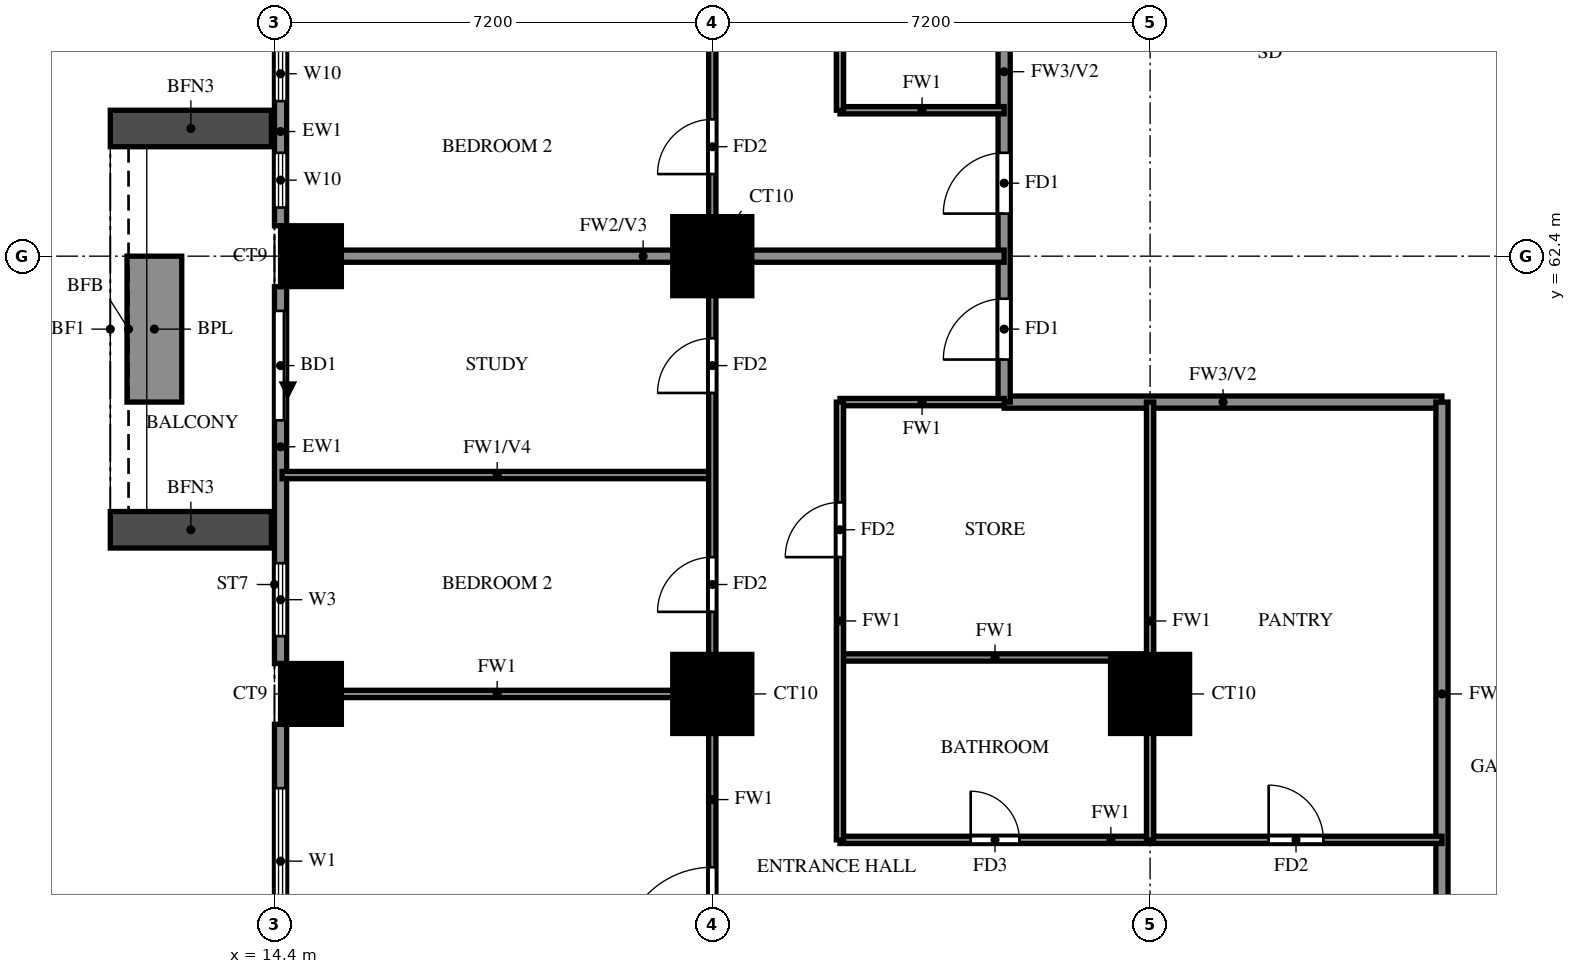
"""IFC4 building model, lengths in metres.
Left out: names, types, materials, properties, quantities, classifications, styles, units other than length and angle.
Written with IfcOpenShell. Run it as: python <this file> out.ifc"""

import sys

from ifc_helpers import new_model, si_unit, direction, frame, frame_2d, origin, origin_2d, place, context, subcontext, project, spatial, rectangle, extrude, source, transform, mapped, element, fill, save


model = new_model("IFC4")
c1 = context("Model", 3, precision=1e-05, world=origin(), true_north=direction((0.0, 1.0)))
c2 = subcontext(c1, "Body", "Model", "MODEL_VIEW")
j1 = project(units=[si_unit("LENGTHUNIT", "METRE"), si_unit("PLANEANGLEUNIT", "RADIAN")], contexts=[c1])
p1 = place(None, origin())
s1 = spatial("IfcSite", under=j1, at=p1, CompositionType="ELEMENT")
p2 = place(p1, origin())
s2 = spatial("IfcBuilding", under=s1, at=p2, CompositionType="ELEMENT")
p3 = place(p2, frame((0.0, 0.0, 72.5)))
s3 = spatial("IfcBuildingStorey", under=s2, at=p3, CompositionType="ELEMENT", Elevation=72.5)
m1 = source(origin(), c2, "Body", "SweptSolid", [
    extrude(rectangle(XDim=1.0, YDim=1.0, at=origin_2d()), origin(), (0.0, 0.0, 1.0), 3.18),
])
p4 = place(p3, frame((15.0, 55.2, 0.0), z_axis=(0.0, 0.0, 1.0), x_axis=(1.0, 0.0, 0.0)))
e1 = element("IfcColumn", 1, at=p4, inside=s3, PredefinedType="COLUMN", context=c2, shape_type="MappedRepresentation", body=[
    mapped(m1, transform((0.0, 0.0, 0.0))),
])
m2 = source(origin(), c2, "Body", "SweptSolid", [
    extrude(rectangle(XDim=1.3, YDim=1.3, at=origin_2d()), origin(), (0.0, 0.0, 1.0), 3.18),
])
for number, where, z_axis, x_axis in (
    (2, (21.6, 55.2, 0.0), (0.0, 0.0, 1.0), (1.0, 0.0, 0.0)),
    (3, (28.8, 55.2, 0.0), (0.0, 0.0, 1.0), (1.0, 0.0, 0.0)),
):
    element("IfcColumn", number, at=place(p3, frame(where, z_axis=z_axis, x_axis=x_axis)), inside=s3, PredefinedType="COLUMN", context=c2, shape_type="MappedRepresentation", body=[
        mapped(m2, transform((0.0, 0.0, 0.0))),
    ])
p5 = place(p3, frame((15.0, 62.4, 0.0), z_axis=(0.0, 0.0, 1.0), x_axis=(1.0, 0.0, 0.0)))
e4 = element("IfcColumn", 4, at=p5, inside=s3, PredefinedType="COLUMN", context=c2, shape_type="MappedRepresentation", body=[
    mapped(m1, transform((0.0, 0.0, 0.0))),
])
p6 = place(p3, frame((21.6, 62.4, 0.0), z_axis=(0.0, 0.0, 1.0), x_axis=(1.0, 0.0, 0.0)))
e5 = element("IfcColumn", 5, at=p6, inside=s3, PredefinedType="COLUMN", context=c2, shape_type="MappedRepresentation", body=[
    mapped(m2, transform((0.0, 0.0, 0.0))),
])
p7 = place(p3, frame((14.5, 69.1, 0.0), z_axis=(0.0, 0.0, 1.0), x_axis=(0.0, -1.0, 0.0)))
e6 = element("IfcWall", 6, at=p7, inside=s3, PredefinedType="SOLIDWALL", context=c2, shape_type="SweptSolid", body=[
    extrude(rectangle(XDim=6.2, YDim=0.2, at=frame_2d((3.1, 0.0))), origin(), (0.0, 0.0, 1.0), 3.18),
])
p8 = place(p7, frame((3.25, 0.0, 0.6)))
e7 = element("IfcOpeningElement", 7, at=p8, cuts=e6, PredefinedType="OPENING", context=c2, shape_type="SweptSolid", body=[
    extrude(rectangle(XDim=0.9, YDim=2.4, at=frame_2d((0.45, 1.2))), frame((0.0, 0.11, 0.0), z_axis=(0.0, -1.0, 0.0), x_axis=(1.0, 0.0, 0.0)), (0.0, 0.0, 1.0), 0.22),
])
p9 = place(p7, frame((5.0, 0.0, 0.6)))
e8 = element("IfcOpeningElement", 8, at=p9, cuts=e6, PredefinedType="OPENING", context=c2, shape_type="SweptSolid", body=[
    extrude(rectangle(XDim=0.9, YDim=2.4, at=frame_2d((0.45, 1.2))), frame((0.0, 0.11, 0.0), z_axis=(0.0, -1.0, 0.0), x_axis=(1.0, 0.0, 0.0)), (0.0, 0.0, 1.0), 0.22),
])
p10 = place(p7, frame((0.75, 0.0, 0.6)))
e9 = element("IfcOpeningElement", 9, at=p10, cuts=e6, PredefinedType="OPENING", context=c2, shape_type="SweptSolid", body=[
    extrude(rectangle(XDim=1.8, YDim=2.4, at=frame_2d((0.9, 1.2))), frame((0.0, 0.11, 0.0), z_axis=(0.0, -1.0, 0.0), x_axis=(1.0, 0.0, 0.0)), (0.0, 0.0, 1.0), 0.22),
])
p11 = place(p3, frame((14.5, 61.9, 0.0), z_axis=(0.0, 0.0, 1.0), x_axis=(0.0, -1.0, 0.0)))
e10 = element("IfcWall", 10, at=p11, inside=s3, PredefinedType="SOLIDWALL", context=c2, shape_type="SweptSolid", body=[
    extrude(rectangle(XDim=6.2, YDim=0.2, at=frame_2d((3.1, 0.0))), origin(), (0.0, 0.0, 1.0), 3.18),
])
p12 = place(p11, frame((0.4, 0.0, 0.0)))
e11 = element("IfcOpeningElement", 11, at=p12, cuts=e10, PredefinedType="OPENING", context=c2, shape_type="SweptSolid", body=[
    extrude(rectangle(XDim=1.8, YDim=2.4, at=frame_2d((0.9, 1.2))), frame((0.0, 0.11, 0.0), z_axis=(0.0, -1.0, 0.0), x_axis=(1.0, 0.0, 0.0)), (0.0, 0.0, 1.0), 0.22),
])
p13 = place(p11, frame((4.55, 0.0, 0.6)))
e12 = element("IfcOpeningElement", 12, at=p13, cuts=e10, PredefinedType="OPENING", context=c2, shape_type="SweptSolid", body=[
    extrude(rectangle(XDim=1.2, YDim=2.4, at=frame_2d((0.6, 1.2))), frame((0.0, 0.11, 0.0), z_axis=(0.0, -1.0, 0.0), x_axis=(1.0, 0.0, 0.0)), (0.0, 0.0, 1.0), 0.22),
])
p14 = place(p3, frame((14.5, 54.7, 0.0), z_axis=(0.0, 0.0, 1.0), x_axis=(0.0, -1.0, 0.0)))
e13 = element("IfcWall", 13, at=p14, inside=s3, PredefinedType="SOLIDWALL", context=c2, shape_type="SweptSolid", body=[
    extrude(rectangle(XDim=6.2, YDim=0.2, at=frame_2d((3.1, 0.0))), origin(), (0.0, 0.0, 1.0), 3.18),
])
p15 = place(p14, frame((1.05, 0.0, 0.6)))
e14 = element("IfcOpeningElement", 14, at=p15, cuts=e13, PredefinedType="OPENING", context=c2, shape_type="SweptSolid", body=[
    extrude(rectangle(XDim=2.4, YDim=2.4, at=frame_2d((1.2, 1.2))), frame((0.0, 0.11, 0.0), z_axis=(0.0, -1.0, 0.0), x_axis=(1.0, 0.0, 0.0)), (0.0, 0.0, 1.0), 0.22),
])
for number, where, z_axis, x_axis in (
    (15, (14.35, 64.5, 0.0), (0.0, 0.0, 1.0), (-1.0, 0.0, 0.0)),
    (16, (14.35, 57.9, 0.0), (0.0, 0.0, 1.0), (-1.0, 0.0, 0.0)),
):
    element("IfcWall", number, at=place(p3, frame(where, z_axis=z_axis, x_axis=x_axis)), inside=s3, PredefinedType="SOLIDWALL", context=c2, shape_type="SweptSolid", body=[
        extrude(rectangle(XDim=2.65, YDim=0.6, at=frame_2d((1.325, 0.0))), origin(), (0.0, 0.0, 1.0), 2.85),
    ])
p16 = place(p3, frame((12.425, 62.4, 0.0), z_axis=(0.0, 0.0, 1.0), x_axis=(0.0, -1.0, 0.0)))
e17 = element("IfcWall", 17, at=p16, inside=s3, PredefinedType="SOLIDWALL", context=c2, shape_type="SweptSolid", body=[
    extrude(rectangle(XDim=2.4, YDim=0.9, at=frame_2d((1.2, 0.0))), origin(), (0.0, 0.0, 1.0), 0.9),
])
p17 = place(p3, frame((26.4, 60.0, 0.0), z_axis=(0.0, 0.0, 1.0), x_axis=(1.0, 0.0, 0.0)))
e18 = element("IfcWall", 18, at=p17, inside=s3, PredefinedType="SOLIDWALL", context=c2, shape_type="SweptSolid", body=[
    extrude(rectangle(XDim=7.2, YDim=0.2, at=frame_2d((3.6, 0.0))), origin(), (0.0, 0.0, 1.0), 3.18),
])
p18 = place(p3, frame((26.4, 60.0, 0.0), z_axis=(0.0, 0.0, 1.0), x_axis=(0.0, 1.0, 0.0)))
e19 = element("IfcWall", 19, at=p18, inside=s3, PredefinedType="SOLIDWALL", context=c2, shape_type="SweptSolid", body=[
    extrude(rectangle(XDim=9.45, YDim=0.2, at=frame_2d((4.725, 0.0))), origin(), (0.0, 0.0, 1.0), 3.18),
])
p19 = place(p18, frame((0.7, 0.0, 0.0)))
e20 = element("IfcOpeningElement", 20, at=p19, cuts=e19, PredefinedType="OPENING", context=c2, shape_type="SweptSolid", body=[
    extrude(rectangle(XDim=1.0, YDim=2.1, at=frame_2d((0.5, 1.05))), frame((0.0, 0.11, 0.0), z_axis=(0.0, -1.0, 0.0), x_axis=(1.0, 0.0, 0.0)), (0.0, 0.0, 1.0), 0.22),
])
p20 = place(p18, frame((3.1, 0.0, 0.0)))
e21 = element("IfcOpeningElement", 21, at=p20, cuts=e19, PredefinedType="OPENING", context=c2, shape_type="SweptSolid", body=[
    extrude(rectangle(XDim=1.0, YDim=2.1, at=frame_2d((0.5, 1.05))), frame((0.0, 0.11, 0.0), z_axis=(0.0, -1.0, 0.0), x_axis=(1.0, 0.0, 0.0)), (0.0, 0.0, 1.0), 0.22),
])
p21 = place(p3, frame((33.6, 50.4, 0.0), z_axis=(0.0, 0.0, 1.0), x_axis=(0.0, 1.0, 0.0)))
e22 = element("IfcWall", 22, at=p21, inside=s3, PredefinedType="SOLIDWALL", context=c2, shape_type="SweptSolid", body=[
    extrude(rectangle(XDim=9.6, YDim=0.2, at=frame_2d((4.8, 0.0))), origin(), (0.0, 0.0, 1.0), 3.18),
])
p22 = place(p3, frame((14.525, 62.4, 0.0), z_axis=(0.0, 0.0, 1.0), x_axis=(1.0, 0.0, 0.0)))
e23 = element("IfcWall", 23, at=p22, inside=s3, PredefinedType="SOLIDWALL", context=c2, shape_type="SweptSolid", body=[
    extrude(rectangle(XDim=11.875, YDim=0.2, at=frame_2d((5.938, 0.0))), origin(), (0.0, 0.0, 1.0), 3.18),
])
p23 = place(p3, frame((23.7, 52.8, 0.0), z_axis=(0.0, 0.0, 1.0), x_axis=(1.0, 0.0, 0.0)))
e24 = element("IfcWall", 24, at=p23, inside=s3, PredefinedType="PARTITIONING", context=c2, shape_type="SweptSolid", body=[
    extrude(rectangle(XDim=9.9, YDim=0.12, at=frame_2d((4.95, 0.0))), origin(), (0.0, 0.0, 1.0), 3.18),
])
p24 = place(p23, frame((2.15, 0.0, 0.0)))
e25 = element("IfcOpeningElement", 25, at=p24, cuts=e24, PredefinedType="OPENING", context=c2, shape_type="SweptSolid", body=[
    extrude(rectangle(XDim=0.8, YDim=2.1, at=frame_2d((0.4, 1.05))), frame((0.0, 0.07, 0.0), z_axis=(0.0, -1.0, 0.0), x_axis=(1.0, 0.0, 0.0)), (0.0, 0.0, 1.0), 0.14),
])
p25 = place(p23, frame((7.05, 0.0, 0.0)))
e26 = element("IfcOpeningElement", 26, at=p25, cuts=e24, PredefinedType="OPENING", context=c2, shape_type="SweptSolid", body=[
    extrude(rectangle(XDim=0.9, YDim=2.1, at=frame_2d((0.45, 1.05))), frame((0.0, 0.07, 0.0), z_axis=(0.0, -1.0, 0.0), x_axis=(1.0, 0.0, 0.0)), (0.0, 0.0, 1.0), 0.14),
])
p26 = place(p3, frame((14.525, 55.2, 0.0), z_axis=(0.0, 0.0, 1.0), x_axis=(1.0, 0.0, 0.0)))
e27 = element("IfcWall", 27, at=p26, inside=s3, PredefinedType="PARTITIONING", context=c2, shape_type="SweptSolid", body=[
    extrude(rectangle(XDim=7.075, YDim=0.12, at=frame_2d((3.538, 0.0))), origin(), (0.0, 0.0, 1.0), 3.18),
])
p27 = place(p3, frame((23.7, 55.8, 0.0), z_axis=(0.0, 0.0, 1.0), x_axis=(1.0, 0.0, 0.0)))
e28 = element("IfcWall", 28, at=p27, inside=s3, PredefinedType="PARTITIONING", context=c2, shape_type="SweptSolid", body=[
    extrude(rectangle(XDim=5.1, YDim=0.12, at=frame_2d((2.55, 0.0))), origin(), (0.0, 0.0, 1.0), 3.18),
])
p28 = place(p3, frame((14.525, 58.8, 0.0), z_axis=(0.0, 0.0, 1.0), x_axis=(1.0, 0.0, 0.0)))
e29 = element("IfcWall", 29, at=p28, inside=s3, PredefinedType="PARTITIONING", context=c2, shape_type="SweptSolid", body=[
    extrude(rectangle(XDim=7.075, YDim=0.12, at=frame_2d((3.538, 0.0))), origin(), (0.0, 0.0, 1.0), 2.28),
])
for number, where, z_axis, x_axis in (
    (30, (23.7, 60.0, 0.0), (0.0, 0.0, 1.0), (1.0, 0.0, 0.0)),
    (31, (23.7, 64.8, 0.0), (0.0, 0.0, 1.0), (1.0, 0.0, 0.0)),
):
    element("IfcWall", number, at=place(p3, frame(where, z_axis=z_axis, x_axis=x_axis)), inside=s3, PredefinedType="PARTITIONING", context=c2, shape_type="SweptSolid", body=[
        extrude(rectangle(XDim=2.7, YDim=0.12, at=frame_2d((1.35, 0.0))), origin(), (0.0, 0.0, 1.0), 3.18),
    ])
p29 = place(p3, frame((21.6, 33.725, 0.0), z_axis=(0.0, 0.0, 1.0), x_axis=(0.0, 1.0, 0.0)))
e32 = element("IfcWall", 32, at=p29, inside=s3, PredefinedType="PARTITIONING", context=c2, shape_type="SweptSolid", body=[
    extrude(rectangle(XDim=39.475, YDim=0.12, at=frame_2d((19.737, 0.0))), origin(), (0.0, 0.0, 1.0), 3.18),
])
p30 = place(p29, frame((7.775, 0.0, 0.0)))
e33 = element("IfcOpeningElement", 33, at=p30, cuts=e32, PredefinedType="OPENING", context=c2, shape_type="SweptSolid", body=[
    extrude(rectangle(XDim=0.9, YDim=2.1, at=frame_2d((0.45, 1.05))), frame((0.0, 0.07, 0.0), z_axis=(0.0, -1.0, 0.0), x_axis=(1.0, 0.0, 0.0)), (0.0, 0.0, 1.0), 0.14),
])
p31 = place(p29, frame((17.125, 0.0, 0.0)))
e34 = element("IfcOpeningElement", 34, at=p31, cuts=e32, PredefinedType="OPENING", context=c2, shape_type="SweptSolid", body=[
    extrude(rectangle(XDim=1.5, YDim=2.1, at=frame_2d((0.75, 1.05))), frame((0.0, 0.07, 0.0), z_axis=(0.0, -1.0, 0.0), x_axis=(1.0, 0.0, 0.0)), (0.0, 0.0, 1.0), 0.14),
])
p32 = place(p29, frame((22.825, 0.0, 0.0)))
e35 = element("IfcOpeningElement", 35, at=p32, cuts=e32, PredefinedType="OPENING", context=c2, shape_type="SweptSolid", body=[
    extrude(rectangle(XDim=0.9, YDim=2.1, at=frame_2d((0.45, 1.05))), frame((0.0, 0.07, 0.0), z_axis=(0.0, -1.0, 0.0), x_axis=(1.0, 0.0, 0.0)), (0.0, 0.0, 1.0), 0.14),
])
p33 = place(p29, frame((26.425, 0.0, 0.0)))
e36 = element("IfcOpeningElement", 36, at=p33, cuts=e32, PredefinedType="OPENING", context=c2, shape_type="SweptSolid", body=[
    extrude(rectangle(XDim=0.9, YDim=2.1, at=frame_2d((0.45, 1.05))), frame((0.0, 0.07, 0.0), z_axis=(0.0, -1.0, 0.0), x_axis=(1.0, 0.0, 0.0)), (0.0, 0.0, 1.0), 0.14),
])
p34 = place(p29, frame((30.025, 0.0, 0.0)))
e37 = element("IfcOpeningElement", 37, at=p34, cuts=e32, PredefinedType="OPENING", context=c2, shape_type="SweptSolid", body=[
    extrude(rectangle(XDim=0.9, YDim=2.1, at=frame_2d((0.45, 1.05))), frame((0.0, 0.07, 0.0), z_axis=(0.0, -1.0, 0.0), x_axis=(1.0, 0.0, 0.0)), (0.0, 0.0, 1.0), 0.14),
])
p35 = place(p29, frame((33.625, 0.0, 0.0)))
e38 = element("IfcOpeningElement", 38, at=p35, cuts=e32, PredefinedType="OPENING", context=c2, shape_type="SweptSolid", body=[
    extrude(rectangle(XDim=0.9, YDim=2.1, at=frame_2d((0.45, 1.05))), frame((0.0, 0.07, 0.0), z_axis=(0.0, -1.0, 0.0), x_axis=(1.0, 0.0, 0.0)), (0.0, 0.0, 1.0), 0.14),
])
p36 = place(p29, frame((37.225, 0.0, 0.0)))
e39 = element("IfcOpeningElement", 39, at=p36, cuts=e32, PredefinedType="OPENING", context=c2, shape_type="SweptSolid", body=[
    extrude(rectangle(XDim=0.9, YDim=2.1, at=frame_2d((0.45, 1.05))), frame((0.0, 0.07, 0.0), z_axis=(0.0, -1.0, 0.0), x_axis=(1.0, 0.0, 0.0)), (0.0, 0.0, 1.0), 0.14),
])
p37 = place(p3, frame((23.7, 52.8, 0.0), z_axis=(0.0, 0.0, 1.0), x_axis=(0.0, 1.0, 0.0)))
e40 = element("IfcWall", 40, at=p37, inside=s3, PredefinedType="PARTITIONING", context=c2, shape_type="SweptSolid", body=[
    extrude(rectangle(XDim=7.2, YDim=0.12, at=frame_2d((3.6, 0.0))), origin(), (0.0, 0.0, 1.0), 3.18),
])
p38 = place(p37, frame((4.65, 0.0, 0.0)))
e41 = element("IfcOpeningElement", 41, at=p38, cuts=e40, PredefinedType="OPENING", context=c2, shape_type="SweptSolid", body=[
    extrude(rectangle(XDim=0.9, YDim=2.1, at=frame_2d((0.45, 1.05))), frame((0.0, 0.07, 0.0), z_axis=(0.0, -1.0, 0.0), x_axis=(1.0, 0.0, 0.0)), (0.0, 0.0, 1.0), 0.14),
])
p39 = place(p3, frame((23.7, 64.8, 0.0), z_axis=(0.0, 0.0, 1.0), x_axis=(0.0, 1.0, 0.0)))
e42 = element("IfcWall", 42, at=p39, inside=s3, PredefinedType="PARTITIONING", context=c2, shape_type="SweptSolid", body=[
    extrude(rectangle(XDim=8.4, YDim=0.12, at=frame_2d((4.2, 0.0))), origin(), (0.0, 0.0, 1.0), 3.18),
])
p40 = place(p39, frame((1.875, 0.0, 0.0)))
e43 = element("IfcOpeningElement", 43, at=p40, cuts=e42, PredefinedType="OPENING", context=c2, shape_type="SweptSolid", body=[
    extrude(rectangle(XDim=0.9, YDim=2.1, at=frame_2d((0.45, 1.05))), frame((0.0, 0.07, 0.0), z_axis=(0.0, -1.0, 0.0), x_axis=(1.0, 0.0, 0.0)), (0.0, 0.0, 1.0), 0.14),
])
p41 = place(p39, frame((6.125, 0.0, 0.0)))
e44 = element("IfcOpeningElement", 44, at=p41, cuts=e42, PredefinedType="OPENING", context=c2, shape_type="SweptSolid", body=[
    extrude(rectangle(XDim=0.8, YDim=2.1, at=frame_2d((0.4, 1.05))), frame((0.0, 0.07, 0.0), z_axis=(0.0, -1.0, 0.0), x_axis=(1.0, 0.0, 0.0)), (0.0, 0.0, 1.0), 0.14),
])
p42 = place(p3, frame((28.8, 52.8, 0.0), z_axis=(0.0, 0.0, 1.0), x_axis=(0.0, 1.0, 0.0)))
e45 = element("IfcWall", 45, at=p42, inside=s3, PredefinedType="PARTITIONING", context=c2, shape_type="SweptSolid", body=[
    extrude(rectangle(XDim=7.2, YDim=0.12, at=frame_2d((3.6, 0.0))), origin(), (0.0, 0.0, 1.0), 3.18),
])
p43 = place(p8, origin())
e46 = element("IfcWindow", 46, at=p43, inside=s3, PartitioningType="SINGLE_PANEL", PredefinedType="WINDOW", context=c2, shape_type="SweptSolid", body=[
    extrude(rectangle(XDim=0.9, YDim=2.4, at=frame_2d((0.45, 1.2))), frame((0.0, 0.03, 0.0), z_axis=(0.0, -1.0, 0.0), x_axis=(1.0, 0.0, 0.0)), (0.0, 0.0, 1.0), 0.06),
])
fill(e7, e46)
p44 = place(p9, origin())
e47 = element("IfcWindow", 47, at=p44, inside=s3, PartitioningType="SINGLE_PANEL", PredefinedType="WINDOW", context=c2, shape_type="SweptSolid", body=[
    extrude(rectangle(XDim=0.9, YDim=2.4, at=frame_2d((0.45, 1.2))), frame((0.0, 0.03, 0.0), z_axis=(0.0, -1.0, 0.0), x_axis=(1.0, 0.0, 0.0)), (0.0, 0.0, 1.0), 0.06),
])
fill(e8, e47)
p45 = place(p12, origin())
e48 = element("IfcDoor", 48, at=p45, inside=s3, OperationType="DOUBLE_DOOR_SLIDING", PredefinedType="DOOR", context=c2, shape_type="SweptSolid", body=[
    extrude(rectangle(XDim=1.8, YDim=2.4, at=frame_2d((0.9, 1.2))), frame((0.0, 0.025, 0.0), z_axis=(0.0, -1.0, 0.0), x_axis=(1.0, 0.0, 0.0)), (0.0, 0.0, 1.0), 0.05),
])
fill(e11, e48)
p46 = place(p13, origin())
e49 = element("IfcWindow", 49, at=p46, inside=s3, PartitioningType="SINGLE_PANEL", PredefinedType="WINDOW", context=c2, shape_type="SweptSolid", body=[
    extrude(rectangle(XDim=1.2, YDim=2.4, at=frame_2d((0.6, 1.2))), frame((0.0, 0.03, 0.0), z_axis=(0.0, -1.0, 0.0), x_axis=(1.0, 0.0, 0.0)), (0.0, 0.0, 1.0), 0.06),
])
fill(e12, e49)
p47 = place(p15, origin())
e50 = element("IfcWindow", 50, at=p47, inside=s3, PartitioningType="DOUBLE_PANEL_VERTICAL", PredefinedType="WINDOW", context=c2, shape_type="SweptSolid", body=[
    extrude(rectangle(XDim=2.4, YDim=2.4, at=frame_2d((1.2, 1.2))), frame((0.0, 0.03, 0.0), z_axis=(0.0, -1.0, 0.0), x_axis=(1.0, 0.0, 0.0)), (0.0, 0.0, 1.0), 0.06),
])
fill(e14, e50)
p48 = place(p19, origin())
e51 = element("IfcDoor", 51, at=p48, inside=s3, OperationType="SINGLE_SWING_RIGHT", PredefinedType="DOOR", context=c2, shape_type="SweptSolid", body=[
    extrude(rectangle(XDim=1.0, YDim=2.1, at=frame_2d((0.5, 1.05))), frame((0.0, 0.025, 0.0), z_axis=(0.0, -1.0, 0.0), x_axis=(1.0, 0.0, 0.0)), (0.0, 0.0, 1.0), 0.05),
])
fill(e20, e51)
p49 = place(p31, origin())
e52 = element("IfcDoor", 52, at=p49, inside=s3, OperationType="SINGLE_SWING_LEFT", PredefinedType="DOOR", context=c2, shape_type="SweptSolid", body=[
    extrude(rectangle(XDim=1.5, YDim=2.1, at=frame_2d((0.75, 1.05))), frame((0.0, 0.025, 0.0), z_axis=(0.0, -1.0, 0.0), x_axis=(1.0, 0.0, 0.0)), (0.0, 0.0, 1.0), 0.05),
])
fill(e34, e52)
p50 = place(p32, origin())
e53 = element("IfcDoor", 53, at=p50, inside=s3, OperationType="SINGLE_SWING_LEFT", PredefinedType="DOOR", context=c2, shape_type="SweptSolid", body=[
    extrude(rectangle(XDim=0.9, YDim=2.1, at=frame_2d((0.45, 1.05))), frame((0.0, 0.025, 0.0), z_axis=(0.0, -1.0, 0.0), x_axis=(1.0, 0.0, 0.0)), (0.0, 0.0, 1.0), 0.05),
])
fill(e35, e53)
p51 = place(p33, origin())
e54 = element("IfcDoor", 54, at=p51, inside=s3, OperationType="SINGLE_SWING_RIGHT", PredefinedType="DOOR", context=c2, shape_type="SweptSolid", body=[
    extrude(rectangle(XDim=0.9, YDim=2.1, at=frame_2d((0.45, 1.05))), frame((0.0, 0.025, 0.0), z_axis=(0.0, -1.0, 0.0), x_axis=(1.0, 0.0, 0.0)), (0.0, 0.0, 1.0), 0.05),
])
fill(e36, e54)
p52 = place(p24, origin())
e55 = element("IfcDoor", 55, at=p52, inside=s3, OperationType="SINGLE_SWING_LEFT", PredefinedType="DOOR", context=c2, shape_type="SweptSolid", body=[
    extrude(rectangle(XDim=0.8, YDim=2.1, at=frame_2d((0.4, 1.05))), frame((0.0, 0.025, 0.0), z_axis=(0.0, -1.0, 0.0), x_axis=(1.0, 0.0, 0.0)), (0.0, 0.0, 1.0), 0.05),
])
fill(e25, e55)
p53 = place(p38, origin())
e56 = element("IfcDoor", 56, at=p53, inside=s3, OperationType="SINGLE_SWING_RIGHT", PredefinedType="DOOR", context=c2, shape_type="SweptSolid", body=[
    extrude(rectangle(XDim=0.9, YDim=2.1, at=frame_2d((0.45, 1.05))), frame((0.0, 0.025, 0.0), z_axis=(0.0, -1.0, 0.0), x_axis=(1.0, 0.0, 0.0)), (0.0, 0.0, 1.0), 0.05),
])
fill(e41, e56)
p54 = place(p25, origin())
e57 = element("IfcDoor", 57, at=p54, inside=s3, OperationType="SINGLE_SWING_LEFT", PredefinedType="DOOR", context=c2, shape_type="SweptSolid", body=[
    extrude(rectangle(XDim=0.9, YDim=2.1, at=frame_2d((0.45, 1.05))), frame((0.0, 0.025, 0.0), z_axis=(0.0, -1.0, 0.0), x_axis=(1.0, 0.0, 0.0)), (0.0, 0.0, 1.0), 0.05),
])
fill(e26, e57)
p55 = place(p20, origin())
e58 = element("IfcDoor", 58, at=p55, inside=s3, OperationType="SINGLE_SWING_LEFT", PredefinedType="DOOR", context=c2, shape_type="SweptSolid", body=[
    extrude(rectangle(XDim=1.0, YDim=2.1, at=frame_2d((0.5, 1.05))), frame((0.0, 0.025, 0.0), z_axis=(0.0, -1.0, 0.0), x_axis=(1.0, 0.0, 0.0)), (0.0, 0.0, 1.0), 0.05),
])
fill(e21, e58)
p56 = place(p34, origin())
e59 = element("IfcDoor", 59, at=p56, inside=s3, OperationType="SINGLE_SWING_LEFT", PredefinedType="DOOR", context=c2, shape_type="SweptSolid", body=[
    extrude(rectangle(XDim=0.9, YDim=2.1, at=frame_2d((0.45, 1.05))), frame((0.0, 0.025, 0.0), z_axis=(0.0, -1.0, 0.0), x_axis=(1.0, 0.0, 0.0)), (0.0, 0.0, 1.0), 0.05),
])
fill(e37, e59)
save(model, sys.argv[1])
